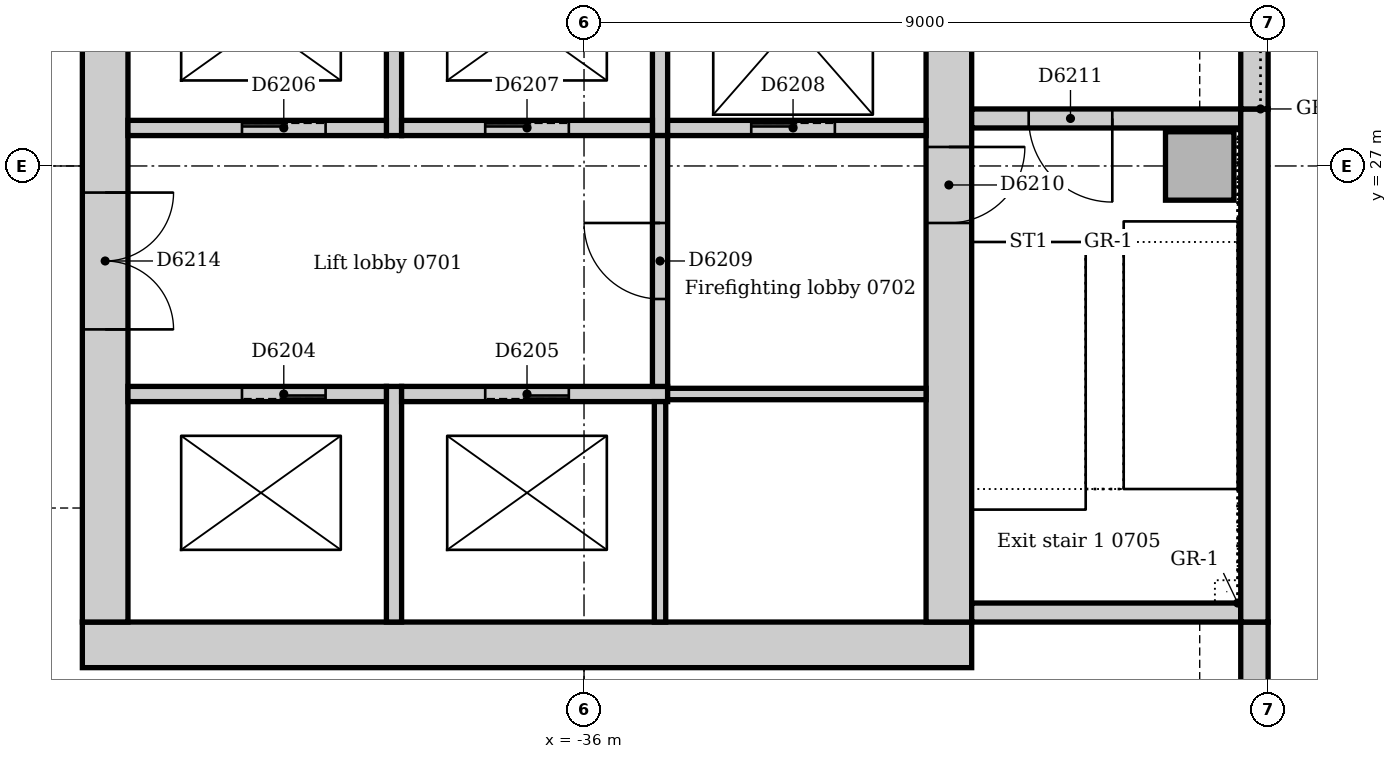
"""IFC4 building model, lengths in metres.
Left out: names, types, materials, properties, quantities, classifications, styles, units other than length and angle.
Written with IfcOpenShell. Run it as: python <this file> out.ifc"""

import sys

from ifc_helpers import new_model, si_unit, direction, frame, frame_2d, origin, origin_2d, place, context, subcontext, project, spatial, rectangle, extrude, element, fill, save


model = new_model("IFC4")
c1 = context("Model", 3, precision=1e-05, world=origin(), true_north=direction((0.0, 1.0)))
c2 = subcontext(c1, "Body", "Model", "MODEL_VIEW")
j1 = project(units=[si_unit("LENGTHUNIT", "METRE"), si_unit("PLANEANGLEUNIT", "RADIAN")], contexts=[c1])
p1 = place(None, origin())
s1 = spatial("IfcSite", under=j1, at=p1, CompositionType="ELEMENT")
p2 = place(p1, origin())
s2 = spatial("IfcBuilding", under=s1, at=p2, CompositionType="ELEMENT")
p3 = place(p2, frame((0.0, 0.0, 34.0)))
s3 = spatial("IfcBuildingStorey", under=s2, at=p3, CompositionType="ELEMENT", Elevation=34.0)
p4 = place(p3, frame((-42.6, 20.7, 0.0), z_axis=(0.0, 0.0, 1.0), x_axis=(1.0, 0.0, 0.0)))
e1 = element("IfcWall", 1, at=p4, inside=s3, PredefinedType="SOLIDWALL", context=c2, shape_type="SweptSolid", body=[
    extrude(rectangle(XDim=11.7, YDim=0.6, at=frame_2d((5.85, 0.0))), origin(), (0.0, 0.0, 1.0), 4.0),
])
p5 = place(p3, frame((-31.2, 21.0, 0.0), z_axis=(0.0, 0.0, 1.0), x_axis=(0.0, 1.0, 0.0)))
e2 = element("IfcWall", 2, at=p5, inside=s3, PredefinedType="SOLIDWALL", context=c2, shape_type="SweptSolid", body=[
    extrude(rectangle(XDim=9.5, YDim=0.6, at=frame_2d((4.75, 0.0))), origin(), (0.0, 0.0, 1.0), 4.0),
])
p6 = place(p5, frame((5.25, 0.0, 0.0)))
e3 = element("IfcOpeningElement", 3, at=p6, cuts=e2, PredefinedType="OPENING", context=c2, shape_type="SweptSolid", body=[
    extrude(rectangle(XDim=1.0, YDim=2.1, at=frame_2d((0.5, 1.05))), frame((0.0, 0.31, 0.0), z_axis=(0.0, -1.0, 0.0), x_axis=(1.0, 0.0, 0.0)), (0.0, 0.0, 1.0), 0.62),
])
p7 = place(p3, frame((-42.3, 30.5, 0.0), z_axis=(0.0, 0.0, 1.0), x_axis=(0.0, -1.0, 0.0)))
e4 = element("IfcWall", 4, at=p7, inside=s3, PredefinedType="SOLIDWALL", context=c2, shape_type="SweptSolid", body=[
    extrude(rectangle(XDim=9.5, YDim=0.6, at=frame_2d((4.75, 0.0))), origin(), (0.0, 0.0, 1.0), 4.0),
])
p8 = place(p7, frame((3.85, 0.0, 0.0)))
e5 = element("IfcOpeningElement", 5, at=p8, cuts=e4, PredefinedType="OPENING", context=c2, shape_type="SweptSolid", body=[
    extrude(rectangle(XDim=1.8, YDim=2.1, at=frame_2d((0.9, 1.05))), frame((0.0, 0.31, 0.0), z_axis=(0.0, -1.0, 0.0), x_axis=(1.0, 0.0, 0.0)), (0.0, 0.0, 1.0), 0.62),
])
p9 = place(p3, frame((-30.9, 21.125, 0.0), z_axis=(0.0, 0.0, 1.0), x_axis=(1.0, 0.0, 0.0)))
e6 = element("IfcWall", 6, at=p9, inside=s3, PredefinedType="SOLIDWALL", context=c2, shape_type="SweptSolid", body=[
    extrude(rectangle(XDim=3.54, YDim=0.25, at=frame_2d((1.77, 0.0))), origin(), (0.0, 0.0, 1.0), 4.0),
])
p10 = place(p3, frame((-27.36, 27.625, 0.0), z_axis=(0.0, 0.0, 1.0), x_axis=(-1.0, 0.0, 0.0)))
e7 = element("IfcWall", 7, at=p10, inside=s3, PredefinedType="SOLIDWALL", context=c2, shape_type="SweptSolid", body=[
    extrude(rectangle(XDim=3.54, YDim=0.25, at=frame_2d((1.77, 0.0))), origin(), (0.0, 0.0, 1.0), 4.0),
])
p11 = place(p10, frame((1.69, 0.0, 0.0)))
e8 = element("IfcOpeningElement", 8, at=p11, cuts=e7, PredefinedType="OPENING", context=c2, shape_type="SweptSolid", body=[
    extrude(rectangle(XDim=1.1, YDim=2.1, at=frame_2d((0.55, 1.05))), frame((0.0, 0.135, 0.0), z_axis=(0.0, -1.0, 0.0), x_axis=(1.0, 0.0, 0.0)), (0.0, 0.0, 1.0), 0.27),
])
p12 = place(p3, frame((-27.9, 27.0, 0.0), z_axis=(0.0, 0.0, 1.0), x_axis=(1.0, 0.0, 0.0)))
e9 = element("IfcColumn", 9, at=p12, inside=s3, PredefinedType="COLUMN", context=c2, shape_type="SweptSolid", body=[
    extrude(rectangle(XDim=0.9, YDim=0.9, at=origin_2d()), origin(), (0.0, 0.0, 1.0), 4.0),
])
p13 = place(p3, frame((-27.18, 8.743, 0.0), z_axis=(0.0, 0.0, 1.0), x_axis=(0.0, 1.0, 0.0)))
e10 = element("IfcWall", 10, at=p13, inside=s3, PredefinedType="STANDARD", context=c2, shape_type="SweptSolid", body=[
    extrude(rectangle(XDim=12.257, YDim=0.36, at=frame_2d((6.129, 0.0))), origin(), (0.0, 0.0, 1.0), 3.85),
])
p14 = place(p13, frame((2.607, 0.0, 0.9)))
e11 = element("IfcOpeningElement", 11, at=p14, cuts=e10, PredefinedType="OPENING", context=c2, shape_type="SweptSolid", body=[
    extrude(rectangle(XDim=3.3, YDim=1.6, at=frame_2d((1.65, 0.8))), frame((0.0, 0.19, 0.0), z_axis=(0.0, -1.0, 0.0), x_axis=(1.0, 0.0, 0.0)), (0.0, 0.0, 1.0), 0.38),
])
p15 = place(p13, frame((7.607, 0.0, 0.9)))
e12 = element("IfcOpeningElement", 12, at=p15, cuts=e10, PredefinedType="OPENING", context=c2, shape_type="SweptSolid", body=[
    extrude(rectangle(XDim=3.3, YDim=1.6, at=frame_2d((1.65, 0.8))), frame((0.0, 0.19, 0.0), z_axis=(0.0, -1.0, 0.0), x_axis=(1.0, 0.0, 0.0)), (0.0, 0.0, 1.0), 0.38),
])
p16 = place(p3, frame((-27.18, 21.0, 0.0), z_axis=(0.0, 0.0, 1.0), x_axis=(0.0, 1.0, 0.0)))
e13 = element("IfcWall", 13, at=p16, inside=s3, PredefinedType="STANDARD", context=c2, shape_type="SweptSolid", body=[
    extrude(rectangle(XDim=6.75, YDim=0.36, at=frame_2d((3.375, 0.0))), origin(), (0.0, 0.0, 1.0), 3.85),
])
p17 = place(p3, frame((-27.18, 27.75, 0.0), z_axis=(0.0, 0.0, 1.0), x_axis=(0.0, 1.0, 0.0)))
e14 = element("IfcWall", 14, at=p17, inside=s3, PredefinedType="STANDARD", context=c2, shape_type="SweptSolid", body=[
    extrude(rectangle(XDim=7.5, YDim=0.36, at=frame_2d((3.75, 0.0))), origin(), (0.0, 0.0, 1.0), 3.85),
])
p18 = place(p17, frame((2.85, 0.0, 1.2)))
e15 = element("IfcOpeningElement", 15, at=p18, cuts=e14, PredefinedType="OPENING", context=c2, shape_type="SweptSolid", body=[
    extrude(rectangle(XDim=1.8, YDim=1.2, at=frame_2d((0.9, 0.6))), frame((0.0, 0.19, 0.0), z_axis=(0.0, -1.0, 0.0), x_axis=(1.0, 0.0, 0.0)), (0.0, 0.0, 1.0), 0.38),
])
p19 = place(p3, frame((-38.5, 21.0, 0.0), z_axis=(0.0, 0.0, 1.0), x_axis=(0.0, 1.0, 0.0)))
e16 = element("IfcWall", 16, at=p19, inside=s3, PredefinedType="SOLIDWALL", context=c2, shape_type="SweptSolid", body=[
    extrude(rectangle(XDim=3.1, YDim=0.2, at=frame_2d((1.55, 0.0))), origin(), (0.0, 0.0, 1.0), 4.0),
])
p20 = place(p3, frame((-38.6, 24.0, 0.0), z_axis=(0.0, 0.0, 1.0), x_axis=(-1.0, 0.0, 0.0)))
e17 = element("IfcWall", 17, at=p20, inside=s3, PredefinedType="SOLIDWALL", context=c2, shape_type="SweptSolid", body=[
    extrude(rectangle(XDim=3.4, YDim=0.2, at=frame_2d((1.7, 0.0))), origin(), (0.0, 0.0, 1.0), 4.0),
])
p21 = place(p20, frame((0.8, 0.0, 0.0)))
e18 = element("IfcOpeningElement", 18, at=p21, cuts=e17, PredefinedType="OPENING", context=c2, shape_type="SweptSolid", body=[
    extrude(rectangle(XDim=1.1, YDim=2.1, at=frame_2d((0.55, 1.05))), frame((0.0, 0.11, 0.0), z_axis=(0.0, -1.0, 0.0), x_axis=(1.0, 0.0, 0.0)), (0.0, 0.0, 1.0), 0.22),
])
p22 = place(p3, frame((-34.9, 24.0, 0.0), z_axis=(0.0, 0.0, 1.0), x_axis=(-1.0, 0.0, 0.0)))
e19 = element("IfcWall", 19, at=p22, inside=s3, PredefinedType="SOLIDWALL", context=c2, shape_type="SweptSolid", body=[
    extrude(rectangle(XDim=3.5, YDim=0.2, at=frame_2d((1.75, 0.0))), origin(), (0.0, 0.0, 1.0), 4.0),
])
p23 = place(p22, frame((1.3, 0.0, 0.0)))
e20 = element("IfcOpeningElement", 20, at=p23, cuts=e19, PredefinedType="OPENING", context=c2, shape_type="SweptSolid", body=[
    extrude(rectangle(XDim=1.1, YDim=2.1, at=frame_2d((0.55, 1.05))), frame((0.0, 0.11, 0.0), z_axis=(0.0, -1.0, 0.0), x_axis=(1.0, 0.0, 0.0)), (0.0, 0.0, 1.0), 0.22),
])
p24 = place(p3, frame((-38.5, 27.4, 0.0), z_axis=(0.0, 0.0, 1.0), x_axis=(0.0, 1.0, 0.0)))
e21 = element("IfcWall", 21, at=p24, inside=s3, PredefinedType="SOLIDWALL", context=c2, shape_type="SweptSolid", body=[
    extrude(rectangle(XDim=2.85, YDim=0.2, at=frame_2d((1.425, 0.0))), origin(), (0.0, 0.0, 1.0), 4.0),
])
p25 = place(p3, frame((-42.0, 27.5, 0.0), z_axis=(0.0, 0.0, 1.0), x_axis=(1.0, 0.0, 0.0)))
e22 = element("IfcWall", 22, at=p25, inside=s3, PredefinedType="SOLIDWALL", context=c2, shape_type="SweptSolid", body=[
    extrude(rectangle(XDim=3.4, YDim=0.2, at=frame_2d((1.7, 0.0))), origin(), (0.0, 0.0, 1.0), 4.0),
])
p26 = place(p25, frame((1.5, 0.0, 0.0)))
e23 = element("IfcOpeningElement", 23, at=p26, cuts=e22, PredefinedType="OPENING", context=c2, shape_type="SweptSolid", body=[
    extrude(rectangle(XDim=1.1, YDim=2.1, at=frame_2d((0.55, 1.05))), frame((0.0, 0.11, 0.0), z_axis=(0.0, -1.0, 0.0), x_axis=(1.0, 0.0, 0.0)), (0.0, 0.0, 1.0), 0.22),
])
p27 = place(p3, frame((-35.0, 27.4, 0.0), z_axis=(0.0, 0.0, 1.0), x_axis=(0.0, 1.0, 0.0)))
e24 = element("IfcWall", 24, at=p27, inside=s3, PredefinedType="SOLIDWALL", context=c2, shape_type="SweptSolid", body=[
    extrude(rectangle(XDim=2.85, YDim=0.2, at=frame_2d((1.425, 0.0))), origin(), (0.0, 0.0, 1.0), 4.0),
])
p28 = place(p3, frame((-38.4, 27.5, 0.0), z_axis=(0.0, 0.0, 1.0), x_axis=(1.0, 0.0, 0.0)))
e25 = element("IfcWall", 25, at=p28, inside=s3, PredefinedType="SOLIDWALL", context=c2, shape_type="SweptSolid", body=[
    extrude(rectangle(XDim=3.3, YDim=0.2, at=frame_2d((1.65, 0.0))), origin(), (0.0, 0.0, 1.0), 4.0),
])
p29 = place(p28, frame((1.1, 0.0, 0.0)))
e26 = element("IfcOpeningElement", 26, at=p29, cuts=e25, PredefinedType="OPENING", context=c2, shape_type="SweptSolid", body=[
    extrude(rectangle(XDim=1.1, YDim=2.1, at=frame_2d((0.55, 1.05))), frame((0.0, 0.11, 0.0), z_axis=(0.0, -1.0, 0.0), x_axis=(1.0, 0.0, 0.0)), (0.0, 0.0, 1.0), 0.22),
])
p30 = place(p3, frame((-34.9, 27.5, 0.0), z_axis=(0.0, 0.0, 1.0), x_axis=(1.0, 0.0, 0.0)))
e27 = element("IfcWall", 27, at=p30, inside=s3, PredefinedType="SOLIDWALL", context=c2, shape_type="SweptSolid", body=[
    extrude(rectangle(XDim=3.4, YDim=0.2, at=frame_2d((1.7, 0.0))), origin(), (0.0, 0.0, 1.0), 4.0),
])
p31 = place(p30, frame((1.1, 0.0, 0.0)))
e28 = element("IfcOpeningElement", 28, at=p31, cuts=e27, PredefinedType="OPENING", context=c2, shape_type="SweptSolid", body=[
    extrude(rectangle(XDim=1.1, YDim=2.1, at=frame_2d((0.55, 1.05))), frame((0.0, 0.11, 0.0), z_axis=(0.0, -1.0, 0.0), x_axis=(1.0, 0.0, 0.0)), (0.0, 0.0, 1.0), 0.22),
])
p32 = place(p3, frame((-35.0, 24.1, 0.0), z_axis=(0.0, 0.0, 1.0), x_axis=(0.0, 1.0, 0.0)))
e29 = element("IfcWall", 29, at=p32, inside=s3, PredefinedType="SOLIDWALL", context=c2, shape_type="SweptSolid", body=[
    extrude(rectangle(XDim=3.3, YDim=0.2, at=frame_2d((1.65, 0.0))), origin(), (0.0, 0.0, 1.0), 4.0),
])
p33 = place(p32, frame((1.15, 0.0, 0.0)))
e30 = element("IfcOpeningElement", 30, at=p33, cuts=e29, PredefinedType="OPENING", context=c2, shape_type="SweptSolid", body=[
    extrude(rectangle(XDim=1.0, YDim=2.1, at=frame_2d((0.5, 1.05))), frame((0.0, 0.11, 0.0), z_axis=(0.0, -1.0, 0.0), x_axis=(1.0, 0.0, 0.0)), (0.0, 0.0, 1.0), 0.22),
])
p34 = place(p3, frame((-35.0, 21.0, 0.0), z_axis=(0.0, 0.0, 1.0), x_axis=(0.0, 1.0, 0.0)))
e31 = element("IfcWall", 31, at=p34, inside=s3, PredefinedType="SOLIDWALL", context=c2, shape_type="SweptSolid", body=[
    extrude(rectangle(XDim=2.9, YDim=0.15, at=frame_2d((1.45, 0.0))), origin(), (0.0, 0.0, 1.0), 4.0),
])
p35 = place(p3, frame((-31.5, 24.0, 0.0), z_axis=(0.0, 0.0, 1.0), x_axis=(-1.0, 0.0, 0.0)))
e32 = element("IfcWall", 32, at=p35, inside=s3, PredefinedType="SOLIDWALL", context=c2, shape_type="SweptSolid", body=[
    extrude(rectangle(XDim=3.4, YDim=0.15, at=frame_2d((1.7, 0.0))), origin(), (0.0, 0.0, 1.0), 4.0),
])
p36 = place(p21, origin())
e33 = element("IfcDoor", 33, at=p36, inside=s3, OperationType="SLIDING_TO_LEFT", PredefinedType="DOOR", context=c2, shape_type="SweptSolid", body=[
    extrude(rectangle(XDim=1.1, YDim=2.1, at=frame_2d((0.55, 1.05))), frame((0.0, 0.025, 0.0), z_axis=(0.0, -1.0, 0.0), x_axis=(1.0, 0.0, 0.0)), (0.0, 0.0, 1.0), 0.05),
])
fill(e18, e33)
p37 = place(p23, origin())
e34 = element("IfcDoor", 34, at=p37, inside=s3, OperationType="SLIDING_TO_LEFT", PredefinedType="DOOR", context=c2, shape_type="SweptSolid", body=[
    extrude(rectangle(XDim=1.1, YDim=2.1, at=frame_2d((0.55, 1.05))), frame((0.0, 0.025, 0.0), z_axis=(0.0, -1.0, 0.0), x_axis=(1.0, 0.0, 0.0)), (0.0, 0.0, 1.0), 0.05),
])
fill(e20, e34)
p38 = place(p26, origin())
e35 = element("IfcDoor", 35, at=p38, inside=s3, OperationType="SLIDING_TO_LEFT", PredefinedType="DOOR", context=c2, shape_type="SweptSolid", body=[
    extrude(rectangle(XDim=1.1, YDim=2.1, at=frame_2d((0.55, 1.05))), frame((0.0, 0.025, 0.0), z_axis=(0.0, -1.0, 0.0), x_axis=(1.0, 0.0, 0.0)), (0.0, 0.0, 1.0), 0.05),
])
fill(e23, e35)
p39 = place(p29, origin())
e36 = element("IfcDoor", 36, at=p39, inside=s3, OperationType="SLIDING_TO_LEFT", PredefinedType="DOOR", context=c2, shape_type="SweptSolid", body=[
    extrude(rectangle(XDim=1.1, YDim=2.1, at=frame_2d((0.55, 1.05))), frame((0.0, 0.025, 0.0), z_axis=(0.0, -1.0, 0.0), x_axis=(1.0, 0.0, 0.0)), (0.0, 0.0, 1.0), 0.05),
])
fill(e26, e36)
p40 = place(p31, origin())
e37 = element("IfcDoor", 37, at=p40, inside=s3, OperationType="SLIDING_TO_LEFT", PredefinedType="DOOR", context=c2, shape_type="SweptSolid", body=[
    extrude(rectangle(XDim=1.1, YDim=2.1, at=frame_2d((0.55, 1.05))), frame((0.0, 0.025, 0.0), z_axis=(0.0, -1.0, 0.0), x_axis=(1.0, 0.0, 0.0)), (0.0, 0.0, 1.0), 0.05),
])
fill(e28, e37)
p41 = place(p33, origin())
e38 = element("IfcDoor", 38, at=p41, inside=s3, OperationType="SINGLE_SWING_RIGHT", PredefinedType="DOOR", context=c2, shape_type="SweptSolid", body=[
    extrude(rectangle(XDim=1.0, YDim=2.1, at=frame_2d((0.5, 1.05))), frame((0.0, 0.025, 0.0), z_axis=(0.0, -1.0, 0.0), x_axis=(1.0, 0.0, 0.0)), (0.0, 0.0, 1.0), 0.05),
])
fill(e30, e38)
p42 = place(p6, frame((1.0, 0.0, 0.0), z_axis=(0.0, 0.0, 1.0), x_axis=(-1.0, 0.0, 0.0)))
e39 = element("IfcDoor", 39, at=p42, inside=s3, OperationType="SINGLE_SWING_LEFT", PredefinedType="DOOR", context=c2, shape_type="SweptSolid", body=[
    extrude(rectangle(XDim=1.0, YDim=2.1, at=frame_2d((0.5, 1.05))), frame((0.0, 0.025, 0.0), z_axis=(0.0, -1.0, 0.0), x_axis=(1.0, 0.0, 0.0)), (0.0, 0.0, 1.0), 0.05),
])
fill(e3, e39)
p43 = place(p11, origin())
e40 = element("IfcDoor", 40, at=p43, inside=s3, OperationType="SINGLE_SWING_LEFT", PredefinedType="DOOR", context=c2, shape_type="SweptSolid", body=[
    extrude(rectangle(XDim=1.1, YDim=2.1, at=frame_2d((0.55, 1.05))), frame((0.0, 0.025, 0.0), z_axis=(0.0, -1.0, 0.0), x_axis=(1.0, 0.0, 0.0)), (0.0, 0.0, 1.0), 0.05),
])
fill(e8, e40)
p44 = place(p8, origin())
e41 = element("IfcDoor", 41, at=p44, inside=s3, OperationType="DOUBLE_DOOR_SINGLE_SWING", PredefinedType="DOOR", context=c2, shape_type="SweptSolid", body=[
    extrude(rectangle(XDim=1.8, YDim=2.1, at=frame_2d((0.9, 1.05))), frame((0.0, 0.025, 0.0), z_axis=(0.0, -1.0, 0.0), x_axis=(1.0, 0.0, 0.0)), (0.0, 0.0, 1.0), 0.05),
])
fill(e5, e41)
save(model, sys.argv[1])
